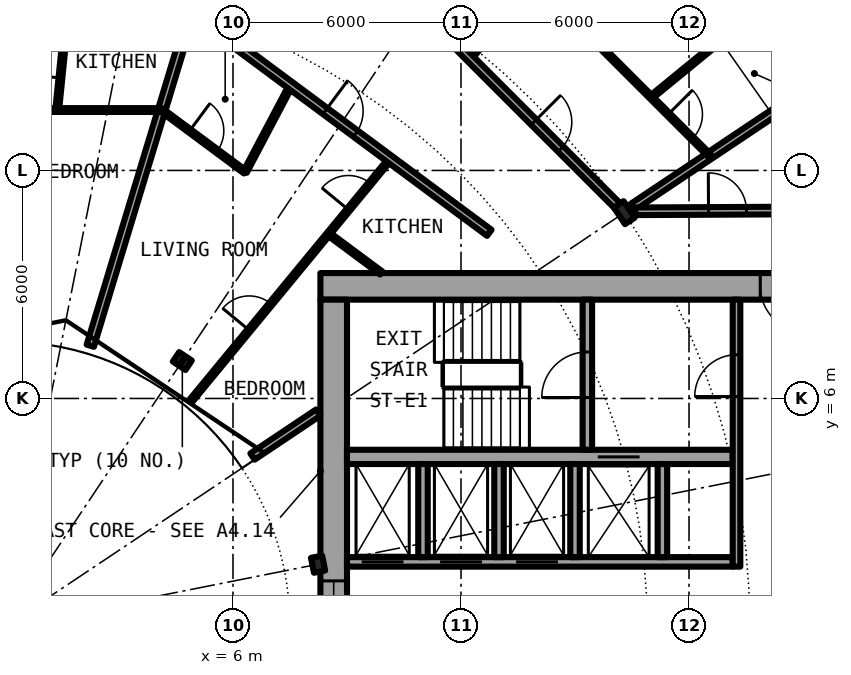
"""IFC4 building model, lengths in metres.
Left out: names, types, materials, properties, quantities, classifications, styles, units other than length and angle.
Written with IfcOpenShell. Run it as: python <this file> out.ifc"""

import sys

from ifc_helpers import new_model, si_unit, direction, frame, frame_2d, origin, origin_2d, place, context, subcontext, project, spatial, rectangle, i_section, extrude, element, fill, save


model = new_model("IFC4")
c1 = context("Model", 3, precision=1e-05, world=origin(), true_north=direction((0.0, 1.0)))
c2 = subcontext(c1, "Body", "Model", "MODEL_VIEW")
j1 = project(units=[si_unit("LENGTHUNIT", "METRE"), si_unit("PLANEANGLEUNIT", "RADIAN")], contexts=[c1])
p1 = place(None, origin())
s1 = spatial("IfcSite", under=j1, at=p1, CompositionType="ELEMENT")
p2 = place(p1, origin())
s2 = spatial("IfcBuilding", under=s1, at=p2, CompositionType="ELEMENT")
p3 = place(p2, frame((0.0, 0.0, 75.8)))
s3 = spatial("IfcBuildingStorey", under=s2, at=p3, CompositionType="ELEMENT", Elevation=75.8)
p4 = place(p3, frame((16.297, 10.889, 0.0), z_axis=(0.0, 0.0, 1.0), x_axis=(0.831469612303, 0.55557023302, 0.0)))
e1 = element("IfcColumn", 1, at=p4, inside=s3, PredefinedType="COLUMN", context=c2, shape_type="SweptSolid", body=[
    extrude(i_section(OverallWidth=0.306, OverallDepth=0.524, WebThickness=0.021, FlangeThickness=0.04, FilletRadius=0.027, at=origin_2d()), origin(), (0.0, 0.0, 1.0), 3.05),
])
for number, where, z_axis, x_axis in (
    (2, (8.239, 1.639, 0.0), (0.0, 0.0, 1.0), (0.981, 0.195, 0.0)),
    (3, (4.667, 6.984, 0.0), (0.0, 0.0, 1.0), (0.556, 0.831, 0.0)),
):
    element("IfcColumn", number, at=place(p3, frame(where, z_axis=z_axis, x_axis=x_axis)), inside=s3, PredefinedType="COLUMN", context=c2, shape_type="SweptSolid", body=[
        extrude(i_section(OverallWidth=0.3, OverallDepth=0.4, WebThickness=0.013, FlangeThickness=0.024, FilletRadius=0.027, at=origin_2d()), origin(), (0.0, 0.0, 1.0), 3.05),
    ])
p5 = place(p3, frame((22.699, 15.167, 0.0), z_axis=(0.0, 0.0, 1.0), x_axis=(-0.634382322723, 0.773019449054, 0.0)))
e4 = element("IfcWall", 4, at=p5, inside=s3, PredefinedType="SOLIDWALL", context=c2, shape_type="SweptSolid", body=[
    extrude(rectangle(XDim=5.352, YDim=0.25, at=frame_2d((2.676, 0.0))), origin(), (0.0, 0.0, 1.0), 2.7),
])
p6 = place(p5, frame((0.441, 0.0, 0.3)))
e5 = element("IfcOpeningElement", 5, at=p6, cuts=e4, PredefinedType="OPENING", context=c2, shape_type="SweptSolid", body=[
    extrude(rectangle(XDim=1.8, YDim=2.1, at=frame_2d((0.9, 1.05))), frame((0.0, 0.135, 0.0), z_axis=(0.0, -1.0, 0.0), x_axis=(1.0, 0.0, 0.0)), (0.0, 0.0, 1.0), 0.27),
])
p7 = place(p5, frame((3.51, 0.0, 0.0)))
e6 = element("IfcOpeningElement", 6, at=p7, cuts=e4, PredefinedType="OPENING", context=c2, shape_type="SweptSolid", body=[
    extrude(rectangle(XDim=1.0, YDim=2.2, at=frame_2d((0.5, 1.1))), frame((0.0, 0.135, 0.0), z_axis=(0.0, -1.0, 0.0), x_axis=(1.0, 0.0, 0.0)), (0.0, 0.0, 1.0), 0.27),
])
p8 = place(p3, frame((22.3, 8.95, 0.0), z_axis=(0.0, 0.0, 1.0), x_axis=(-1.0, 0.0, 0.0)))
e7 = element("IfcWall", 7, at=p8, inside=s3, PredefinedType="SHEAR", context=c2, shape_type="SweptSolid", body=[
    extrude(rectangle(XDim=14.0, YDim=0.7, at=frame_2d((7.0, 0.0))), origin(), (0.0, 0.0, 1.0), 3.05),
])
p9 = place(p8, frame((1.225, 0.0, 0.0)))
e8 = element("IfcOpeningElement", 8, at=p9, cuts=e7, PredefinedType="OPENING", context=c2, shape_type="SweptSolid", body=[
    extrude(rectangle(XDim=1.2, YDim=2.3, at=frame_2d((0.6, 1.15))), frame((0.0, 0.36, 0.0), z_axis=(0.0, -1.0, 0.0), x_axis=(1.0, 0.0, 0.0)), (0.0, 0.0, 1.0), 0.72),
])
p10 = place(p3, frame((8.65, -8.6, 0.0), z_axis=(0.0, 0.0, 1.0), x_axis=(0.0, 1.0, 0.0)))
e9 = element("IfcWall", 9, at=p10, inside=s3, PredefinedType="SHEAR", context=c2, shape_type="SweptSolid", body=[
    extrude(rectangle(XDim=17.2, YDim=0.7, at=frame_2d((8.6, 0.0))), origin(), (0.0, 0.0, 1.0), 3.05),
])
p11 = place(p10, frame((7.4, 0.0, 0.1)))
e10 = element("IfcOpeningElement", 10, at=p11, cuts=e9, PredefinedType="OPENING", context=c2, shape_type="SweptSolid", body=[
    extrude(rectangle(XDim=2.4, YDim=2.2, at=frame_2d((1.2, 1.1))), frame((0.0, 0.36, 0.0), z_axis=(0.0, -1.0, 0.0), x_axis=(1.0, 0.0, 0.0)), (0.0, 0.0, 1.0), 0.72),
])
p12 = place(p3, frame((9.0, 1.7, 0.0), z_axis=(0.0, 0.0, 1.0), x_axis=(1.0, 0.0, 0.0)))
e11 = element("IfcWall", 11, at=p12, inside=s3, PredefinedType="SHEAR", context=c2, shape_type="SweptSolid", body=[
    extrude(rectangle(XDim=10.15, YDim=0.25, at=frame_2d((5.075, 0.0))), origin(), (0.0, 0.0, 1.0), 3.05),
])
p13 = place(p12, frame((0.387, 0.0, 0.0)))
e12 = element("IfcOpeningElement", 12, at=p13, cuts=e11, PredefinedType="OPENING", context=c2, shape_type="SweptSolid", body=[
    extrude(rectangle(XDim=1.1, YDim=2.3, at=frame_2d((0.55, 1.15))), frame((0.0, 0.135, 0.0), z_axis=(0.0, -1.0, 0.0), x_axis=(1.0, 0.0, 0.0)), (0.0, 0.0, 1.0), 0.27),
])
p14 = place(p12, frame((2.45, 0.0, 0.0)))
e13 = element("IfcOpeningElement", 13, at=p14, cuts=e11, PredefinedType="OPENING", context=c2, shape_type="SweptSolid", body=[
    extrude(rectangle(XDim=1.1, YDim=2.3, at=frame_2d((0.55, 1.15))), frame((0.0, 0.135, 0.0), z_axis=(0.0, -1.0, 0.0), x_axis=(1.0, 0.0, 0.0)), (0.0, 0.0, 1.0), 0.27),
])
p15 = place(p12, frame((4.45, 0.0, 0.0)))
e14 = element("IfcOpeningElement", 14, at=p15, cuts=e11, PredefinedType="OPENING", context=c2, shape_type="SweptSolid", body=[
    extrude(rectangle(XDim=1.1, YDim=2.3, at=frame_2d((0.55, 1.15))), frame((0.0, 0.135, 0.0), z_axis=(0.0, -1.0, 0.0), x_axis=(1.0, 0.0, 0.0)), (0.0, 0.0, 1.0), 0.27),
])
p16 = place(p3, frame((9.0, 4.462, 0.0), z_axis=(0.0, 0.0, 1.0), x_axis=(1.0, 0.0, 0.0)))
e15 = element("IfcWall", 15, at=p16, inside=s3, PredefinedType="SHEAR", context=c2, shape_type="SweptSolid", body=[
    extrude(rectangle(XDim=10.15, YDim=0.375, at=frame_2d((5.075, 0.0))), origin(), (0.0, 0.0, 1.0), 3.05),
])
p17 = place(p16, frame((6.6, 0.0, 0.0)))
e16 = element("IfcOpeningElement", 16, at=p17, cuts=e15, PredefinedType="OPENING", context=c2, shape_type="SweptSolid", body=[
    extrude(rectangle(XDim=1.1, YDim=2.3, at=frame_2d((0.55, 1.15))), frame((0.0, 0.198, 0.0), z_axis=(0.0, -1.0, 0.0), x_axis=(1.0, 0.0, 0.0)), (0.0, 0.0, 1.0), 0.395),
])
p18 = place(p3, frame((15.325, 4.65, 0.0), z_axis=(0.0, 0.0, 1.0), x_axis=(0.0, 1.0, 0.0)))
e17 = element("IfcWall", 17, at=p18, inside=s3, PredefinedType="SHEAR", context=c2, shape_type="SweptSolid", body=[
    extrude(rectangle(XDim=3.95, YDim=0.25, at=frame_2d((1.975, 0.0))), origin(), (0.0, 0.0, 1.0), 3.05),
])
p19 = place(p18, frame((1.375, 0.0, 0.0)))
e18 = element("IfcOpeningElement", 18, at=p19, cuts=e17, PredefinedType="OPENING", context=c2, shape_type="SweptSolid", body=[
    extrude(rectangle(XDim=1.2, YDim=2.3, at=frame_2d((0.6, 1.15))), frame((0.0, 0.135, 0.0), z_axis=(0.0, -1.0, 0.0), x_axis=(1.0, 0.0, 0.0)), (0.0, 0.0, 1.0), 0.27),
])
for number, where, z_axis, x_axis in (
    (19, (15.0, 1.825, 0.0), (0.0, 0.0, 1.0), (0.0, 1.0, 0.0)),
    (20, (17.3, 1.825, 0.0), (0.0, 0.0, 1.0), (0.0, 1.0, 0.0)),
):
    element("IfcWall", number, at=place(p3, frame(where, z_axis=z_axis, x_axis=x_axis)), inside=s3, PredefinedType="SOLIDWALL", context=c2, shape_type="SweptSolid", body=[
        extrude(rectangle(XDim=2.45, YDim=0.25, at=frame_2d((1.225, 0.0))), origin(), (0.0, 0.0, 1.0), 2.7),
    ])
p20 = place(p3, frame((19.25, 1.575, 0.0), z_axis=(0.0, 0.0, 1.0), x_axis=(0.0, 1.0, 0.0)))
e21 = element("IfcWall", 21, at=p20, inside=s3, PredefinedType="SOLIDWALL", context=c2, shape_type="SweptSolid", body=[
    extrude(rectangle(XDim=7.025, YDim=0.2, at=frame_2d((3.513, 0.0))), origin(), (0.0, 0.0, 1.0), 2.7),
])
p21 = place(p20, frame((4.475, 0.0, 0.0)))
e22 = element("IfcOpeningElement", 22, at=p21, cuts=e21, PredefinedType="OPENING", context=c2, shape_type="SweptSolid", body=[
    extrude(rectangle(XDim=1.1, YDim=2.3, at=frame_2d((0.55, 1.15))), frame((0.0, 0.11, 0.0), z_axis=(0.0, -1.0, 0.0), x_axis=(1.0, 0.0, 0.0)), (0.0, 0.0, 1.0), 0.22),
])
for number, where, z_axis, x_axis in (
    (23, (11.0, 1.825, 0.0), (0.0, 0.0, 1.0), (0.0, 1.0, 0.0)),
    (24, (13.0, 1.825, 0.0), (0.0, 0.0, 1.0), (0.0, 1.0, 0.0)),
):
    element("IfcWall", number, at=place(p3, frame(where, z_axis=z_axis, x_axis=x_axis)), inside=s3, PredefinedType="SOLIDWALL", context=c2, shape_type="SweptSolid", body=[
        extrude(rectangle(XDim=2.45, YDim=0.25, at=frame_2d((1.225, 0.0))), origin(), (0.0, 0.0, 1.0), 2.7),
    ])
p22 = place(p3, frame((2.245, 7.387, 0.0), z_axis=(0.0, 0.0, 1.0), x_axis=(0.289977130626, 0.957033575019, 0.0)))
e25 = element("IfcWall", 25, at=p22, inside=s3, PredefinedType="PARTITIONING", context=c2, shape_type="SweptSolid", body=[
    extrude(rectangle(XDim=9.18, YDim=0.2, at=frame_2d((4.59, 0.0))), origin(), (0.0, 0.0, 1.0), 2.7),
])
p23 = place(p3, frame((1.374, 13.589, 0.0), z_axis=(0.0, 0.0, 1.0), x_axis=(0.100527855112, 0.994934244233, 0.0)))
e26 = element("IfcWall", 26, at=p23, inside=s3, PredefinedType="PARTITIONING", context=c2, shape_type="SweptSolid", body=[
    extrude(rectangle(XDim=2.596, YDim=0.1, at=frame_2d((1.298, 0.0))), origin(), (0.0, 0.0, 1.0), 2.7),
])
p24 = place(p23, frame((0.848, 0.0, 0.0)))
e27 = element("IfcOpeningElement", 27, at=p24, cuts=e26, PredefinedType="OPENING", context=c2, shape_type="SweptSolid", body=[
    extrude(rectangle(XDim=0.9, YDim=2.3, at=frame_2d((0.45, 1.15))), frame((0.0, 0.06, 0.0), z_axis=(0.0, -1.0, 0.0), x_axis=(1.0, 0.0, 0.0)), (0.0, 0.0, 1.0), 0.12),
])
p25 = place(p3, frame((4.909, 5.958, 0.0), z_axis=(0.0, 0.0, 1.0), x_axis=(0.635976043025, 0.771708800454, 0.0)))
e28 = element("IfcWall", 28, at=p25, inside=s3, PredefinedType="PARTITIONING", context=c2, shape_type="SweptSolid", body=[
    extrude(rectangle(XDim=8.213, YDim=0.1, at=frame_2d((4.106, 0.0))), origin(), (0.0, 0.0, 1.0), 2.7),
])
p26 = place(p25, frame((6.49, 0.0, 0.0)))
e29 = element("IfcOpeningElement", 29, at=p26, cuts=e28, PredefinedType="OPENING", context=c2, shape_type="SweptSolid", body=[
    extrude(rectangle(XDim=0.9, YDim=2.3, at=frame_2d((0.45, 1.15))), frame((0.0, 0.06, 0.0), z_axis=(0.0, -1.0, 0.0), x_axis=(1.0, 0.0, 0.0)), (0.0, 0.0, 1.0), 0.12),
])
p27 = place(p25, frame((2.384, 0.0, 0.0)))
e30 = element("IfcOpeningElement", 30, at=p27, cuts=e28, PredefinedType="OPENING", context=c2, shape_type="SweptSolid", body=[
    extrude(rectangle(XDim=0.9, YDim=2.3, at=frame_2d((0.45, 1.15))), frame((0.0, 0.06, 0.0), z_axis=(0.0, -1.0, 0.0), x_axis=(1.0, 0.0, 0.0)), (0.0, 0.0, 1.0), 0.12),
])
p28 = place(p3, frame((6.318, 11.96, 0.0), z_axis=(0.0, 0.0, 1.0), x_axis=(0.467001992543, 0.884256263173, 0.0)))
e31 = element("IfcWall", 31, at=p28, inside=s3, PredefinedType="PARTITIONING", context=c2, shape_type="SweptSolid", body=[
    extrude(rectangle(XDim=2.572, YDim=0.1, at=frame_2d((1.286, 0.0))), origin(), (0.0, 0.0, 1.0), 2.7),
])
p29 = place(p3, frame((12.241, 14.945, 0.0), z_axis=(0.0, 0.0, 1.0), x_axis=(0.633582447834, 0.77367517848, 0.0)))
e32 = element("IfcWall", 32, at=p29, inside=s3, PredefinedType="PARTITIONING", context=c2, shape_type="SweptSolid", body=[
    extrude(rectangle(XDim=2.661, YDim=0.1, at=frame_2d((1.331, 0.0))), origin(), (0.0, 0.0, 1.0), 2.7),
])
p30 = place(p29, frame((0.881, 0.0, 0.0)))
e33 = element("IfcOpeningElement", 33, at=p30, cuts=e32, PredefinedType="OPENING", context=c2, shape_type="SweptSolid", body=[
    extrude(rectangle(XDim=0.9, YDim=2.3, at=frame_2d((0.45, 1.15))), frame((0.0, 0.06, 0.0), z_axis=(0.0, -1.0, 0.0), x_axis=(1.0, 0.0, 0.0)), (0.0, 0.0, 1.0), 0.12),
])
p31 = place(p3, frame((16.515, 11.034, 0.0), z_axis=(0.0, 0.0, 1.0), x_axis=(0.831382022135, 0.555701298605, 0.0)))
e34 = element("IfcWall", 34, at=p31, inside=s3, PredefinedType="PARTITIONING", context=c2, shape_type="SweptSolid", body=[
    extrude(rectangle(XDim=7.313, YDim=0.2, at=frame_2d((3.657, 0.0))), origin(), (0.0, 0.0, 1.0), 2.7),
])
p32 = place(p3, frame((17.004, 13.927, 0.0), z_axis=(0.0, 0.0, 1.0), x_axis=(0.773517471898, 0.633774976367, 0.0)))
e35 = element("IfcWall", 35, at=p32, inside=s3, PredefinedType="PARTITIONING", context=c2, shape_type="SweptSolid", body=[
    extrude(rectangle(XDim=5.196, YDim=0.1, at=frame_2d((2.598, 0.0))), origin(), (0.0, 0.0, 1.0), 2.7),
])
p33 = place(p3, frame((6.513, 4.472, 0.0), z_axis=(0.0, 0.0, 1.0), x_axis=(0.831382204863, 0.555701025225, 0.0)))
e36 = element("IfcWall", 36, at=p33, inside=s3, PredefinedType="PARTITIONING", context=c2, shape_type="SweptSolid", body=[
    extrude(rectangle(XDim=2.082, YDim=0.2, at=frame_2d((1.041, 0.0))), origin(), (0.0, 0.0, 1.0), 2.7),
])
p34 = place(p3, frame((16.588, 10.925, 0.0), z_axis=(0.0, 0.0, 1.0), x_axis=(0.999988019025, 0.004895079807, 0.0)))
e37 = element("IfcWall", 37, at=p34, inside=s3, PredefinedType="PARTITIONING", context=c2, shape_type="SweptSolid", body=[
    extrude(rectangle(XDim=5.087, YDim=0.2, at=frame_2d((2.543, 0.0))), origin(), (0.0, 0.0, 1.0), 2.7),
])
p35 = place(p34, frame((1.925, 0.0, 0.0)))
e38 = element("IfcOpeningElement", 38, at=p35, cuts=e37, PredefinedType="OPENING", context=c2, shape_type="SweptSolid", body=[
    extrude(rectangle(XDim=1.0, YDim=2.3, at=frame_2d((0.5, 1.15))), frame((0.0, 0.11, 0.0), z_axis=(0.0, -1.0, 0.0), x_axis=(1.0, 0.0, 0.0)), (0.0, 0.0, 1.0), 0.22),
])
p36 = place(p3, frame((4.122, 13.589, 0.0), z_axis=(0.0, 0.0, 1.0), x_axis=(0.803128348509, -0.595806055542, 0.0)))
e39 = element("IfcWall", 39, at=p36, inside=s3, PredefinedType="PARTITIONING", context=c2, shape_type="SweptSolid", body=[
    extrude(rectangle(XDim=2.734, YDim=0.1, at=frame_2d((1.367, 0.0))), origin(), (0.0, 0.0, 1.0), 2.7),
])
p37 = place(p36, frame((0.917, 0.0, 0.0)))
e40 = element("IfcOpeningElement", 40, at=p37, cuts=e39, PredefinedType="OPENING", context=c2, shape_type="SweptSolid", body=[
    extrude(rectangle(XDim=0.9, YDim=2.3, at=frame_2d((0.45, 1.15))), frame((0.0, 0.06, 0.0), z_axis=(0.0, -1.0, 0.0), x_axis=(1.0, 0.0, 0.0)), (0.0, 0.0, 1.0), 0.12),
])
p38 = place(p3, frame((8.512, 10.332, 0.0), z_axis=(0.0, 0.0, 1.0), x_axis=(0.803135014325, -0.595797070121, 0.0)))
e41 = element("IfcWall", 41, at=p38, inside=s3, PredefinedType="PARTITIONING", context=c2, shape_type="SweptSolid", body=[
    extrude(rectangle(XDim=1.732, YDim=0.1, at=frame_2d((0.866, 0.0))), origin(), (0.0, 0.0, 1.0), 2.7),
])
p39 = place(p3, frame((0.0, 13.589, 0.0), z_axis=(0.0, 0.0, 1.0), x_axis=(1.0, 0.0, 0.0)))
e42 = element("IfcWall", 42, at=p39, inside=s3, PredefinedType="PARTITIONING", context=c2, shape_type="SweptSolid", body=[
    extrude(rectangle(XDim=4.122, YDim=0.1, at=frame_2d((2.061, 0.0))), origin(), (0.0, 0.0, 1.0), 2.7),
])
p40 = place(p3, frame((4.906, 16.172, 0.0), z_axis=(0.0, 0.0, 1.0), x_axis=(0.803191461888, -0.595720971219, 0.0)))
e43 = element("IfcWall", 43, at=p40, inside=s3, PredefinedType="PARTITIONING", context=c2, shape_type="SweptSolid", body=[
    extrude(rectangle(XDim=9.76, YDim=0.2, at=frame_2d((4.88, 0.0))), origin(), (0.0, 0.0, 1.0), 2.7),
])
p41 = place(p40, frame((4.38, 0.0, 0.0)))
e44 = element("IfcOpeningElement", 44, at=p41, cuts=e43, PredefinedType="OPENING", context=c2, shape_type="SweptSolid", body=[
    extrude(rectangle(XDim=1.0, YDim=2.3, at=frame_2d((0.5, 1.15))), frame((0.0, 0.11, 0.0), z_axis=(0.0, -1.0, 0.0), x_axis=(1.0, 0.0, 0.0)), (0.0, 0.0, 1.0), 0.22),
])
p42 = place(p3, frame((11.0, 16.186, 0.0), z_axis=(0.0, 0.0, 1.0), x_axis=(0.707106781187, -0.707106781187, 0.0)))
e45 = element("IfcWall", 45, at=p42, inside=s3, PredefinedType="PARTITIONING", context=c2, shape_type="SweptSolid", body=[
    extrude(rectangle(XDim=7.334, YDim=0.2, at=frame_2d((3.667, 0.0))), origin(), (0.0, 0.0, 1.0), 2.38),
])
p43 = place(p42, frame((4.123, 0.0, 0.0)))
e46 = element("IfcOpeningElement", 46, at=p43, cuts=e45, PredefinedType="OPENING", context=c2, shape_type="SweptSolid", body=[
    extrude(rectangle(XDim=1.0, YDim=2.3, at=frame_2d((0.5, 1.15))), frame((0.0, 0.11, 0.0), z_axis=(0.0, -1.0, 0.0), x_axis=(1.0, 0.0, 0.0)), (0.0, 0.0, 1.0), 0.22),
])
p44 = place(p3, frame((15.465, 15.465, 0.0), z_axis=(0.0, 0.0, 1.0), x_axis=(0.707190945535, -0.707022606819, 0.0)))
e47 = element("IfcWall", 47, at=p44, inside=s3, PredefinedType="PARTITIONING", context=c2, shape_type="SweptSolid", body=[
    extrude(rectangle(XDim=4.351, YDim=0.1, at=frame_2d((2.175, 0.0))), origin(), (0.0, 0.0, 1.0), 2.7),
])
p45 = place(p44, frame((2.812, 0.0, 0.0)))
e48 = element("IfcOpeningElement", 48, at=p45, cuts=e47, PredefinedType="OPENING", context=c2, shape_type="SweptSolid", body=[
    extrude(rectangle(XDim=0.9, YDim=2.3, at=frame_2d((0.45, 1.15))), frame((0.0, 0.06, 0.0), z_axis=(0.0, -1.0, 0.0), x_axis=(1.0, 0.0, 0.0)), (0.0, 0.0, 1.0), 0.12),
])
p46 = place(p13, origin())
e49 = element("IfcDoor", 49, at=p46, inside=s3, OperationType="DOUBLE_DOOR_SLIDING", PredefinedType="DOOR", context=c2, shape_type="SweptSolid", body=[
    extrude(rectangle(XDim=1.1, YDim=2.3, at=frame_2d((0.55, 1.15))), frame((0.0, 0.025, 0.0), z_axis=(0.0, -1.0, 0.0), x_axis=(1.0, 0.0, 0.0)), (0.0, 0.0, 1.0), 0.05),
])
fill(e12, e49)
p47 = place(p14, origin())
e50 = element("IfcDoor", 50, at=p47, inside=s3, OperationType="DOUBLE_DOOR_SLIDING", PredefinedType="DOOR", context=c2, shape_type="SweptSolid", body=[
    extrude(rectangle(XDim=1.1, YDim=2.3, at=frame_2d((0.55, 1.15))), frame((0.0, 0.025, 0.0), z_axis=(0.0, -1.0, 0.0), x_axis=(1.0, 0.0, 0.0)), (0.0, 0.0, 1.0), 0.05),
])
fill(e13, e50)
p48 = place(p15, origin())
e51 = element("IfcDoor", 51, at=p48, inside=s3, OperationType="DOUBLE_DOOR_SLIDING", PredefinedType="DOOR", context=c2, shape_type="SweptSolid", body=[
    extrude(rectangle(XDim=1.1, YDim=2.3, at=frame_2d((0.55, 1.15))), frame((0.0, 0.025, 0.0), z_axis=(0.0, -1.0, 0.0), x_axis=(1.0, 0.0, 0.0)), (0.0, 0.0, 1.0), 0.05),
])
fill(e14, e51)
p49 = place(p17, origin())
e52 = element("IfcDoor", 52, at=p49, inside=s3, OperationType="DOUBLE_DOOR_SLIDING", PredefinedType="DOOR", context=c2, shape_type="SweptSolid", body=[
    extrude(rectangle(XDim=1.1, YDim=2.3, at=frame_2d((0.55, 1.15))), frame((0.0, 0.025, 0.0), z_axis=(0.0, -1.0, 0.0), x_axis=(1.0, 0.0, 0.0)), (0.0, 0.0, 1.0), 0.05),
])
fill(e16, e52)
p50 = place(p19, origin())
e53 = element("IfcDoor", 53, at=p50, inside=s3, OperationType="SINGLE_SWING_LEFT", PredefinedType="DOOR", context=c2, shape_type="SweptSolid", body=[
    extrude(rectangle(XDim=1.2, YDim=2.3, at=frame_2d((0.6, 1.15))), frame((0.0, 0.025, 0.0), z_axis=(0.0, -1.0, 0.0), x_axis=(1.0, 0.0, 0.0)), (0.0, 0.0, 1.0), 0.05),
])
fill(e18, e53)
p51 = place(p21, origin())
e54 = element("IfcDoor", 54, at=p51, inside=s3, OperationType="SINGLE_SWING_LEFT", PredefinedType="DOOR", context=c2, shape_type="SweptSolid", body=[
    extrude(rectangle(XDim=1.1, YDim=2.3, at=frame_2d((0.55, 1.15))), frame((0.0, 0.025, 0.0), z_axis=(0.0, -1.0, 0.0), x_axis=(1.0, 0.0, 0.0)), (0.0, 0.0, 1.0), 0.05),
])
fill(e22, e54)
p52 = place(p9, origin())
e55 = element("IfcDoor", 55, at=p52, inside=s3, OperationType="SINGLE_SWING_RIGHT", PredefinedType="DOOR", context=c2, shape_type="SweptSolid", body=[
    extrude(rectangle(XDim=1.2, YDim=2.3, at=frame_2d((0.6, 1.15))), frame((0.0, 0.025, 0.0), z_axis=(0.0, -1.0, 0.0), x_axis=(1.0, 0.0, 0.0)), (0.0, 0.0, 1.0), 0.05),
])
fill(e8, e55)
p53 = place(p11, origin())
e56 = element("IfcWindow", 56, at=p53, inside=s3, PartitioningType="SINGLE_PANEL", PredefinedType="WINDOW", context=c2, shape_type="SweptSolid", body=[
    extrude(rectangle(XDim=2.4, YDim=2.2, at=frame_2d((1.2, 1.1))), frame((0.0, 0.03, 0.0), z_axis=(0.0, -1.0, 0.0), x_axis=(1.0, 0.0, 0.0)), (0.0, 0.0, 1.0), 0.06),
])
fill(e10, e56)
p54 = place(p43, origin())
e57 = element("IfcDoor", 57, at=p54, inside=s3, OperationType="SINGLE_SWING_RIGHT", PredefinedType="DOOR", context=c2, shape_type="SweptSolid", body=[
    extrude(rectangle(XDim=1.0, YDim=2.3, at=frame_2d((0.5, 1.15))), frame((0.0, 0.025, 0.0), z_axis=(0.0, -1.0, 0.0), x_axis=(1.0, 0.0, 0.0)), (0.0, 0.0, 1.0), 0.05),
])
fill(e46, e57)
p55 = place(p45, origin())
e58 = element("IfcDoor", 58, at=p55, inside=s3, OperationType="SINGLE_SWING_RIGHT", PredefinedType="DOOR", context=c2, shape_type="SweptSolid", body=[
    extrude(rectangle(XDim=0.9, YDim=2.3, at=frame_2d((0.45, 1.15))), frame((0.0, 0.025, 0.0), z_axis=(0.0, -1.0, 0.0), x_axis=(1.0, 0.0, 0.0)), (0.0, 0.0, 1.0), 0.05),
])
fill(e48, e58)
p56 = place(p41, origin())
e59 = element("IfcDoor", 59, at=p56, inside=s3, OperationType="SINGLE_SWING_LEFT", PredefinedType="DOOR", context=c2, shape_type="SweptSolid", body=[
    extrude(rectangle(XDim=1.0, YDim=2.3, at=frame_2d((0.5, 1.15))), frame((0.0, 0.025, 0.0), z_axis=(0.0, -1.0, 0.0), x_axis=(1.0, 0.0, 0.0)), (0.0, 0.0, 1.0), 0.05),
])
fill(e44, e59)
p57 = place(p37, origin())
e60 = element("IfcDoor", 60, at=p57, inside=s3, OperationType="SINGLE_SWING_LEFT", PredefinedType="DOOR", context=c2, shape_type="SweptSolid", body=[
    extrude(rectangle(XDim=0.9, YDim=2.3, at=frame_2d((0.45, 1.15))), frame((0.0, 0.025, 0.0), z_axis=(0.0, -1.0, 0.0), x_axis=(1.0, 0.0, 0.0)), (0.0, 0.0, 1.0), 0.05),
])
fill(e40, e60)
p58 = place(p26, origin())
e61 = element("IfcDoor", 61, at=p58, inside=s3, OperationType="SINGLE_SWING_RIGHT", PredefinedType="DOOR", context=c2, shape_type="SweptSolid", body=[
    extrude(rectangle(XDim=0.9, YDim=2.3, at=frame_2d((0.45, 1.15))), frame((0.0, 0.025, 0.0), z_axis=(0.0, -1.0, 0.0), x_axis=(1.0, 0.0, 0.0)), (0.0, 0.0, 1.0), 0.05),
])
fill(e29, e61)
p59 = place(p27, origin())
e62 = element("IfcDoor", 62, at=p59, inside=s3, OperationType="SINGLE_SWING_LEFT", PredefinedType="DOOR", context=c2, shape_type="SweptSolid", body=[
    extrude(rectangle(XDim=0.9, YDim=2.3, at=frame_2d((0.45, 1.15))), frame((0.0, 0.025, 0.0), z_axis=(0.0, -1.0, 0.0), x_axis=(1.0, 0.0, 0.0)), (0.0, 0.0, 1.0), 0.05),
])
fill(e30, e62)
p60 = place(p24, origin())
e63 = element("IfcDoor", 63, at=p60, inside=s3, OperationType="SINGLE_SWING_RIGHT", PredefinedType="DOOR", context=c2, shape_type="SweptSolid", body=[
    extrude(rectangle(XDim=0.9, YDim=2.3, at=frame_2d((0.45, 1.15))), frame((0.0, 0.025, 0.0), z_axis=(0.0, -1.0, 0.0), x_axis=(1.0, 0.0, 0.0)), (0.0, 0.0, 1.0), 0.05),
])
fill(e27, e63)
p61 = place(p35, origin())
e64 = element("IfcDoor", 64, at=p61, inside=s3, OperationType="SINGLE_SWING_LEFT", PredefinedType="DOOR", context=c2, shape_type="SweptSolid", body=[
    extrude(rectangle(XDim=1.0, YDim=2.3, at=frame_2d((0.5, 1.15))), frame((0.0, 0.025, 0.0), z_axis=(0.0, -1.0, 0.0), x_axis=(1.0, 0.0, 0.0)), (0.0, 0.0, 1.0), 0.05),
])
fill(e38, e64)
save(model, sys.argv[1])
